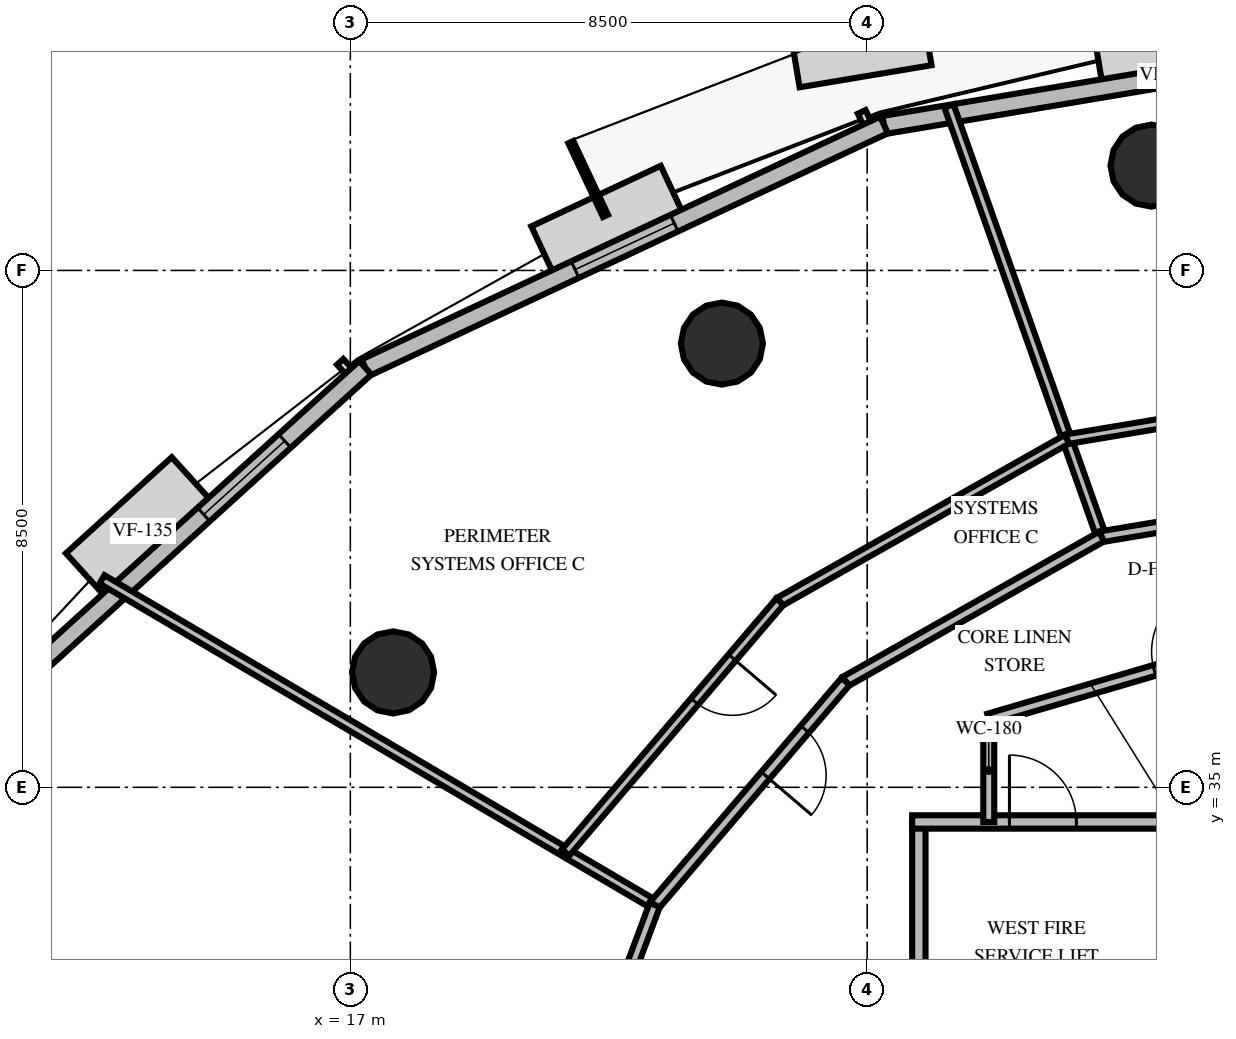
"""IFC4 building model, lengths in metres.
Left out: names, types, materials, properties, quantities, classifications, styles, units other than length and angle.
Written with IfcOpenShell. Run it as: python <this file> out.ifc"""

import sys

from ifc_helpers import new_model, si_unit, direction, frame, frame_2d, origin, origin_2d, place, context, subcontext, project, spatial, rectangle, circle, extrude, element, fill, save


model = new_model("IFC4")
c1 = context("Model", 3, precision=1e-05, world=origin(), true_north=direction((0.0, 1.0)))
c2 = subcontext(c1, "Body", "Model", "MODEL_VIEW")
j1 = project(units=[si_unit("LENGTHUNIT", "METRE"), si_unit("PLANEANGLEUNIT", "RADIAN")], contexts=[c1])
p1 = place(None, origin())
s1 = spatial("IfcSite", under=j1, at=p1, CompositionType="ELEMENT")
p2 = place(p1, origin())
s2 = spatial("IfcBuilding", under=s1, at=p2, CompositionType="ELEMENT")
p3 = place(p2, frame((0.0, 0.0, 72.0)))
s3 = spatial("IfcBuildingStorey", under=s2, at=p3, CompositionType="ELEMENT", Elevation=72.0)
for number, where, z_axis, x_axis in (
    (1, (30.176, 45.223, 0.0), (0.0, 0.0, 1.0), (1.0, 0.0, 0.0)),
    (2, (23.111, 42.297, 0.0), (0.0, 0.0, 1.0), (1.0, 0.0, 0.0)),
    (3, (17.703, 36.889, 0.0), (0.0, 0.0, 1.0), (1.0, 0.0, 0.0)),
):
    element("IfcColumn", number, at=place(p3, frame(where, z_axis=z_axis, x_axis=x_axis)), inside=s3, PredefinedType="COLUMN", context=c2, shape_type="SweptSolid", body=[
        extrude(circle(Radius=0.675, at=origin_2d()), origin(), (0.0, 0.0, 1.0), 4.2),
    ])
p4 = place(p3, frame((35.299, 47.486, 0.0), z_axis=(0.0, 0.0, 1.0), x_axis=(-0.986285729655, -0.165046840259, 0.0)))
e4 = element("IfcWall", 4, at=p4, inside=s3, PredefinedType="SOLIDWALL", context=c2, shape_type="SweptSolid", body=[
    extrude(rectangle(XDim=9.655, YDim=0.3, at=frame_2d((4.827, 0.0))), origin(), (0.0, 0.0, 1.0), 3.0),
])
p5 = place(p4, frame((0.75, 0.0, 0.0)))
e5 = element("IfcOpeningElement", 5, at=p5, cuts=e4, PredefinedType="OPENING", context=c2, shape_type="SweptSolid", body=[
    extrude(rectangle(XDim=1.05, YDim=2.15, at=frame_2d((0.525, 1.075))), frame((0.0, 0.16, 0.0), z_axis=(0.0, -1.0, 0.0), x_axis=(1.0, 0.0, 0.0)), (0.0, 0.0, 1.0), 0.32),
])
p6 = place(p3, frame((25.777, 45.892, 0.0), z_axis=(0.0, 0.0, 1.0), x_axis=(-0.90569382635, -0.423932415499, 0.0)))
e6 = element("IfcWall", 6, at=p6, inside=s3, PredefinedType="SOLIDWALL", context=c2, shape_type="SweptSolid", body=[
    extrude(rectangle(XDim=9.419, YDim=0.3, at=frame_2d((4.709, 0.0))), origin(), (0.0, 0.0, 1.0), 3.0),
])
p7 = place(p6, frame((3.809, 0.0, 0.8)))
e7 = element("IfcOpeningElement", 7, at=p7, cuts=e6, PredefinedType="OPENING", context=c2, shape_type="SweptSolid", body=[
    extrude(rectangle(XDim=1.8, YDim=1.95, at=frame_2d((0.9, 0.975))), frame((0.0, 0.16, 0.0), z_axis=(0.0, -1.0, 0.0), x_axis=(1.0, 0.0, 0.0)), (0.0, 0.0, 1.0), 0.32),
])
p8 = place(p3, frame((17.246, 41.899, 0.0), z_axis=(0.0, 0.0, 1.0), x_axis=(-0.74036835803, -0.672201379371, 0.0)))
e8 = element("IfcWall", 8, at=p8, inside=s3, PredefinedType="SOLIDWALL", context=c2, shape_type="SweptSolid", body=[
    extrude(rectangle(XDim=8.793, YDim=0.3, at=frame_2d((4.396, 0.0))), origin(), (0.0, 0.0, 1.0), 3.0),
])
p9 = place(p8, frame((1.79, 0.0, 0.8)))
e9 = element("IfcOpeningElement", 9, at=p9, cuts=e8, PredefinedType="OPENING", context=c2, shape_type="SweptSolid", body=[
    extrude(rectangle(XDim=1.8, YDim=1.95, at=frame_2d((0.9, 0.975))), frame((0.0, 0.16, 0.0), z_axis=(0.0, -1.0, 0.0), x_axis=(1.0, 0.0, 0.0)), (0.0, 0.0, 1.0), 0.32),
])
p10 = place(p3, frame((26.35, 30.05, 0.0), z_axis=(0.0, 0.0, 1.0), x_axis=(0.0, 1.0, 0.0)))
e10 = element("IfcWall", 10, at=p10, inside=s3, PredefinedType="SOLIDWALL", context=c2, shape_type="SweptSolid", body=[
    extrude(rectangle(XDim=4.38, YDim=0.22, at=frame_2d((2.19, 0.0))), origin(), (0.0, 0.0, 1.0), 3.0),
])
p11 = place(p3, frame((26.24, 34.43, 0.0), z_axis=(0.0, 0.0, 1.0), x_axis=(1.0, 0.0, 0.0)))
e11 = element("IfcWall", 11, at=p11, inside=s3, PredefinedType="SOLIDWALL", context=c2, shape_type="SweptSolid", body=[
    extrude(rectangle(XDim=4.31, YDim=0.22, at=frame_2d((2.155, 0.0))), origin(), (0.0, 0.0, 1.0), 3.0),
])
p12 = place(p11, frame((1.6, 0.0, 0.0)))
e12 = element("IfcOpeningElement", 12, at=p12, cuts=e11, PredefinedType="OPENING", context=c2, shape_type="SweptSolid", body=[
    extrude(rectangle(XDim=1.1, YDim=2.15, at=frame_2d((0.55, 1.075))), frame((0.0, 0.12, 0.0), z_axis=(0.0, -1.0, 0.0), x_axis=(1.0, 0.0, 0.0)), (0.0, 0.0, 1.0), 0.24),
])
p13 = place(p3, frame((27.5, 34.43, 0.0), z_axis=(0.0, 0.0, 1.0), x_axis=(0.0, 1.0, 0.0)))
e13 = element("IfcWall", 13, at=p13, inside=s3, PredefinedType="PARTITIONING", context=c2, shape_type="SweptSolid", body=[
    extrude(rectangle(XDim=1.693, YDim=0.18, at=frame_2d((0.846, 0.0))), origin(), (0.0, 0.0, 1.0), 3.0),
])
p14 = place(p3, frame((27.5, 36.123, 0.0), z_axis=(0.0, 0.0, 1.0), x_axis=(0.959546654541, 0.281549671923, 0.0)))
e14 = element("IfcWall", 14, at=p14, inside=s3, PredefinedType="PARTITIONING", context=c2, shape_type="SweptSolid", body=[
    extrude(rectangle(XDim=6.774, YDim=0.18, at=frame_2d((3.387, 0.0))), origin(), (0.0, 0.0, 1.0), 3.0),
])
p15 = place(p14, frame((2.837, 0.0, 0.0)))
e15 = element("IfcOpeningElement", 15, at=p15, cuts=e14, PredefinedType="OPENING", context=c2, shape_type="SweptSolid", body=[
    extrude(rectangle(XDim=1.1, YDim=2.15, at=frame_2d((0.55, 1.075))), frame((0.0, 0.1, 0.0), z_axis=(0.0, -1.0, 0.0), x_axis=(1.0, 0.0, 0.0)), (0.0, 0.0, 1.0), 0.2),
])
p16 = place(p3, frame((29.354, 39.122, 0.0), z_axis=(0.0, 0.0, 1.0), x_axis=(-0.333815866185, 0.942638301515, 0.0)))
e16 = element("IfcWall", 16, at=p16, inside=s3, PredefinedType="PARTITIONING", context=c2, shape_type="SweptSolid", body=[
    extrude(rectangle(XDim=7.514, YDim=0.16, at=frame_2d((3.757, 0.0))), origin(), (0.0, 0.0, 1.0), 3.0),
])
p17 = place(p3, frame((34.122, 39.919, 0.0), z_axis=(0.0, 0.0, 1.0), x_axis=(-0.986287255142, -0.165037724004, 0.0)))
e17 = element("IfcWall", 17, at=p17, inside=s3, PredefinedType="PARTITIONING", context=c2, shape_type="SweptSolid", body=[
    extrude(rectangle(XDim=4.834, YDim=0.18, at=frame_2d((2.417, 0.0))), origin(), (0.0, 0.0, 1.0), 3.0),
])
p18 = place(p3, frame((34.136, 41.619, 0.0), z_axis=(0.0, 0.0, 1.0), x_axis=(-0.986287896555, -0.16503389079, 0.0)))
e18 = element("IfcWall", 18, at=p18, inside=s3, PredefinedType="PARTITIONING", context=c2, shape_type="SweptSolid", body=[
    extrude(rectangle(XDim=5.425, YDim=0.16, at=frame_2d((2.712, 0.0))), origin(), (0.0, 0.0, 1.0), 3.0),
])
p19 = place(p3, frame((22.006, 33.065, 0.0), z_axis=(0.0, 0.0, 1.0), x_axis=(-0.8616300832, 0.507536796424, 0.0)))
e19 = element("IfcWall", 19, at=p19, inside=s3, PredefinedType="PARTITIONING", context=c2, shape_type="SweptSolid", body=[
    extrude(rectangle(XDim=10.551, YDim=0.16, at=frame_2d((5.275, 0.0))), origin(), (0.0, 0.0, 1.0), 3.0),
])
p20 = place(p3, frame((29.354, 39.122, 0.0), z_axis=(0.0, 0.0, 1.0), x_axis=(-0.870357726762, -0.492419970621, 0.0)))
e20 = element("IfcWall", 20, at=p20, inside=s3, PredefinedType="PARTITIONING", context=c2, shape_type="SweptSolid", body=[
    extrude(rectangle(XDim=4.834, YDim=0.18, at=frame_2d((2.417, 0.0))), origin(), (0.0, 0.0, 1.0), 3.0),
])
p21 = place(p3, frame((25.146, 36.741, 0.0), z_axis=(0.0, 0.0, 1.0), x_axis=(-0.649451176298, -0.760403294052, 0.0)))
e21 = element("IfcWall", 21, at=p21, inside=s3, PredefinedType="PARTITIONING", context=c2, shape_type="SweptSolid", body=[
    extrude(rectangle(XDim=4.834, YDim=0.18, at=frame_2d((2.417, 0.0))), origin(), (0.0, 0.0, 1.0), 3.0),
])
p22 = place(p21, frame((1.034, 0.0, 0.0)))
e22 = element("IfcOpeningElement", 22, at=p22, cuts=e21, PredefinedType="OPENING", context=c2, shape_type="SweptSolid", body=[
    extrude(rectangle(XDim=1.0, YDim=2.15, at=frame_2d((0.5, 1.075))), frame((0.0, 0.1, 0.0), z_axis=(0.0, -1.0, 0.0), x_axis=(1.0, 0.0, 0.0)), (0.0, 0.0, 1.0), 0.2),
])
p23 = place(p3, frame((28.786, 40.724, 0.0), z_axis=(0.0, 0.0, 1.0), x_axis=(-0.870345661177, -0.492441296065, 0.0)))
e23 = element("IfcWall", 23, at=p23, inside=s3, PredefinedType="PARTITIONING", context=c2, shape_type="SweptSolid", body=[
    extrude(rectangle(XDim=5.425, YDim=0.16, at=frame_2d((2.712, 0.0))), origin(), (0.0, 0.0, 1.0), 3.0),
])
p24 = place(p3, frame((24.064, 38.053, 0.0), z_axis=(0.0, 0.0, 1.0), x_axis=(-0.649433806755, -0.760418128824, 0.0)))
e24 = element("IfcWall", 24, at=p24, inside=s3, PredefinedType="PARTITIONING", context=c2, shape_type="SweptSolid", body=[
    extrude(rectangle(XDim=5.425, YDim=0.16, at=frame_2d((2.712, 0.0))), origin(), (0.0, 0.0, 1.0), 3.0),
])
p25 = place(p24, frame((1.209, 0.0, 0.0)))
e25 = element("IfcOpeningElement", 25, at=p25, cuts=e24, PredefinedType="OPENING", context=c2, shape_type="SweptSolid", body=[
    extrude(rectangle(XDim=0.95, YDim=2.15, at=frame_2d((0.475, 1.075))), frame((0.0, 0.09, 0.0), z_axis=(0.0, -1.0, 0.0), x_axis=(1.0, 0.0, 0.0)), (0.0, 0.0, 1.0), 0.18),
])
p26 = place(p3, frame((22.006, 33.065, 0.0), z_axis=(0.0, 0.0, 1.0), x_axis=(-0.350215664948, -0.936669092062, 0.0)))
e26 = element("IfcWall", 26, at=p26, inside=s3, PredefinedType="PARTITIONING", context=c2, shape_type="SweptSolid", body=[
    extrude(rectangle(XDim=4.834, YDim=0.18, at=frame_2d((2.417, 0.0))), origin(), (0.0, 0.0, 1.0), 3.0),
])
p27 = place(p7, origin())
e27 = element("IfcWindow", 27, at=p27, inside=s3, PartitioningType="SINGLE_PANEL", PredefinedType="WINDOW", context=c2, shape_type="SweptSolid", body=[
    extrude(rectangle(XDim=1.8, YDim=1.95, at=frame_2d((0.9, 0.975))), frame((0.0, 0.03, 0.0), z_axis=(0.0, -1.0, 0.0), x_axis=(1.0, 0.0, 0.0)), (0.0, 0.0, 1.0), 0.06),
])
fill(e7, e27)
p28 = place(p9, origin())
e28 = element("IfcWindow", 28, at=p28, inside=s3, PartitioningType="SINGLE_PANEL", PredefinedType="WINDOW", context=c2, shape_type="SweptSolid", body=[
    extrude(rectangle(XDim=1.8, YDim=1.95, at=frame_2d((0.9, 0.975))), frame((0.0, 0.03, 0.0), z_axis=(0.0, -1.0, 0.0), x_axis=(1.0, 0.0, 0.0)), (0.0, 0.0, 1.0), 0.06),
])
fill(e9, e28)
p29 = place(p12, origin())
e29 = element("IfcDoor", 29, at=p29, inside=s3, OperationType="SINGLE_SWING_LEFT", PredefinedType="DOOR", context=c2, shape_type="SweptSolid", body=[
    extrude(rectangle(XDim=1.1, YDim=2.15, at=frame_2d((0.55, 1.075))), frame((0.0, 0.025, 0.0), z_axis=(0.0, -1.0, 0.0), x_axis=(1.0, 0.0, 0.0)), (0.0, 0.0, 1.0), 0.05),
])
fill(e12, e29)
p30 = place(p15, origin())
e30 = element("IfcDoor", 30, at=p30, inside=s3, OperationType="SINGLE_SWING_RIGHT", PredefinedType="DOOR", context=c2, shape_type="SweptSolid", body=[
    extrude(rectangle(XDim=1.1, YDim=2.15, at=frame_2d((0.55, 1.075))), frame((0.0, 0.025, 0.0), z_axis=(0.0, -1.0, 0.0), x_axis=(1.0, 0.0, 0.0)), (0.0, 0.0, 1.0), 0.05),
])
fill(e15, e30)
p31 = place(p22, origin())
e31 = element("IfcDoor", 31, at=p31, inside=s3, OperationType="SINGLE_SWING_RIGHT", PredefinedType="DOOR", context=c2, shape_type="SweptSolid", body=[
    extrude(rectangle(XDim=1.0, YDim=2.15, at=frame_2d((0.5, 1.075))), frame((0.0, 0.025, 0.0), z_axis=(0.0, -1.0, 0.0), x_axis=(1.0, 0.0, 0.0)), (0.0, 0.0, 1.0), 0.05),
])
fill(e22, e31)
p32 = place(p25, origin())
e32 = element("IfcDoor", 32, at=p32, inside=s3, OperationType="SINGLE_SWING_LEFT", PredefinedType="DOOR", context=c2, shape_type="SweptSolid", body=[
    extrude(rectangle(XDim=0.95, YDim=2.15, at=frame_2d((0.475, 1.075))), frame((0.0, 0.025, 0.0), z_axis=(0.0, -1.0, 0.0), x_axis=(1.0, 0.0, 0.0)), (0.0, 0.0, 1.0), 0.05),
])
fill(e25, e32)
save(model, sys.argv[1])
